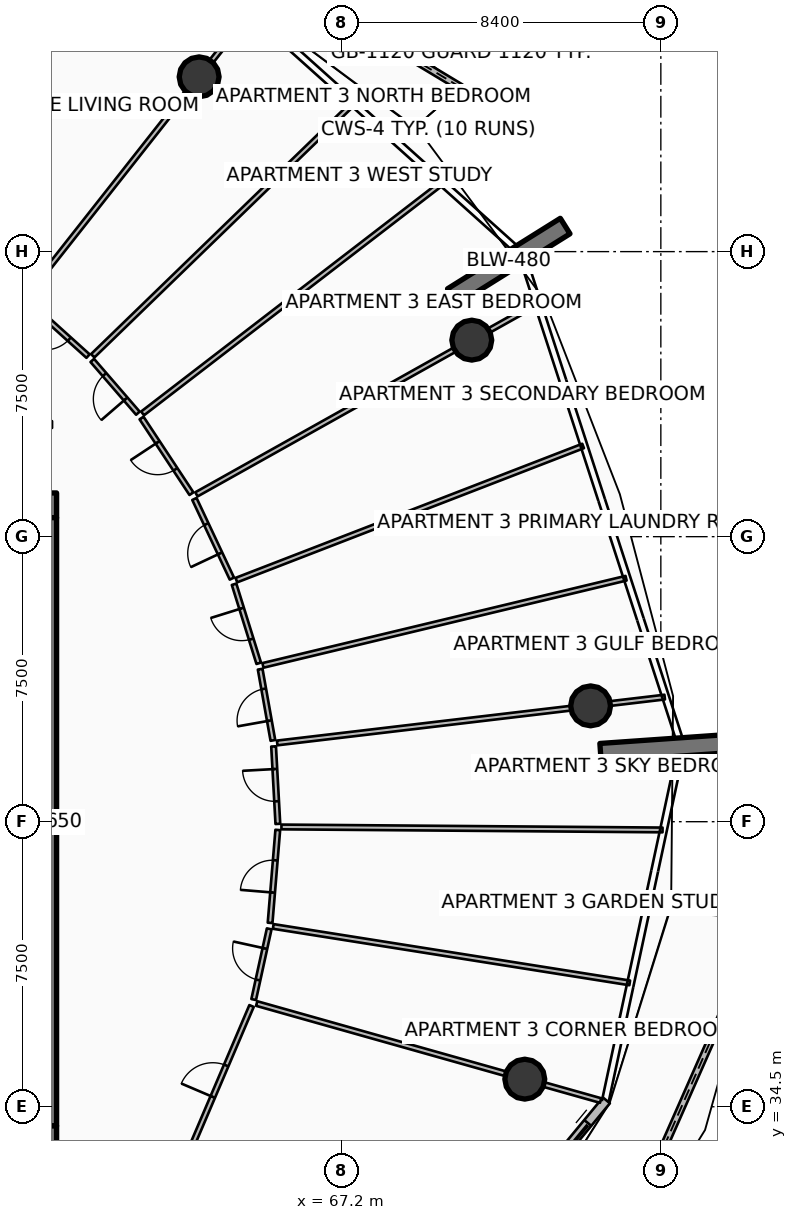
"""IFC4 building model, lengths in metres.
Left out: names, types, materials, properties, quantities, classifications, styles, units other than length and angle.
Written with IfcOpenShell. Run it as: python <this file> out.ifc"""

import sys

from ifc_helpers import new_model, si_unit, direction, frame, frame_2d, origin, origin_2d, place, context, subcontext, project, spatial, polyline, rectangle, circle, outline, extrude, element, fill, save


model = new_model("IFC4")
c1 = context("Model", 3, precision=1e-05, world=origin(), true_north=direction((0.0, 1.0)))
c2 = subcontext(c1, "Body", "Model", "MODEL_VIEW")
j1 = project(units=[si_unit("LENGTHUNIT", "METRE"), si_unit("PLANEANGLEUNIT", "RADIAN")], contexts=[c1])
p1 = place(None, origin())
s1 = spatial("IfcSite", under=j1, at=p1, CompositionType="ELEMENT")
p2 = place(p1, origin())
s2 = spatial("IfcBuilding", under=s1, at=p2, CompositionType="ELEMENT")
p3 = place(p2, frame((0.0, 0.0, 184.05)))
s3 = spatial("IfcBuildingStorey", under=s2, at=p3, CompositionType="ELEMENT", Elevation=184.05)
for number, where, z_axis, x_axis in (
    (1, (49.95, 33.675, 0.0), (0.0, 0.0, 1.0), (1.0, 0.0, 0.0)),
    (2, (49.95, 50.325, 0.0), (0.0, 0.0, 1.0), (1.0, 0.0, 0.0)),
):
    element("IfcWall", number, at=place(p3, frame(where, z_axis=z_axis, x_axis=x_axis)), inside=s3, PredefinedType="SHEAR", context=c2, shape_type="SweptSolid", body=[
        extrude(rectangle(XDim=9.75, YDim=0.65, at=frame_2d((4.875, 0.0))), origin(), (0.0, 0.0, 1.0), 3.75),
    ])
p4 = place(p3, frame((59.375, 34.0, 0.0), z_axis=(0.0, 0.0, 1.0), x_axis=(0.0, 1.0, 0.0)))
e3 = element("IfcWall", 3, at=p4, inside=s3, PredefinedType="SHEAR", context=c2, shape_type="SweptSolid", body=[
    extrude(rectangle(XDim=16.0, YDim=0.65, at=frame_2d((8.0, 0.0))), origin(), (0.0, 0.0, 1.0), 3.75),
])
p5 = place(p3, frame((70.114, 55.818, 0.0), z_axis=(0.0, 0.0, 1.0), x_axis=(0.848033572426, 0.529942506352, 0.0)))
e4 = element("IfcWall", 4, at=p5, inside=s3, PredefinedType="SOLIDWALL", context=c2, shape_type="SweptSolid", body=[
    extrude(rectangle(XDim=3.5, YDim=0.48, at=frame_2d((1.75, 0.0))), origin(), (0.0, 0.0, 1.0), 3.75),
])
p6 = place(p3, frame((74.013, 43.819, 0.0), z_axis=(0.0, 0.0, 1.0), x_axis=(0.997568676264, 0.069690287244, 0.0)))
e5 = element("IfcWall", 5, at=p6, inside=s3, PredefinedType="SOLIDWALL", context=c2, shape_type="SweptSolid", body=[
    extrude(rectangle(XDim=3.5, YDim=0.48, at=frame_2d((1.75, 0.0))), origin(), (0.0, 0.0, 1.0), 3.75),
])
for number, where, z_axis, x_axis in (
    (6, (70.625, 54.671, 0.0), (0.0, 0.0, 1.0), (1.0, 0.0, 0.0)),
    (7, (63.451, 61.599, 0.0), (0.0, 0.0, 1.0), (1.0, 0.0, 0.0)),
    (8, (72.02, 35.226, 0.0), (0.0, 0.0, 1.0), (1.0, 0.0, 0.0)),
    (9, (73.752, 45.048, 0.0), (0.0, 0.0, 1.0), (1.0, 0.0, 0.0)),
):
    element("IfcColumn", number, at=place(p3, frame(where, z_axis=z_axis, x_axis=x_axis)), inside=s3, PredefinedType="COLUMN", context=c2, shape_type="SweptSolid", body=[
        extrude(circle(Radius=0.525, at=origin_2d()), origin(), (0.0, 0.0, 1.0), 3.5),
    ])
p7 = place(p3, frame((70.34, 61.317, 0.0), z_axis=(0.0, 0.0, 1.0), x_axis=(-0.856758582714, 0.515717685314, 0.0)))
e10 = element("IfcWall", 10, at=p7, inside=s3, PredefinedType="PARAPET", context=c2, shape_type="SweptSolid", body=[
    extrude(outline(polyline([(0.0, 0.0), (11.043, 0.0), (11.043, 1.348), (5.521, 1.182), (0.0, 1.12), (0.0, 0.0)])), frame((0.0, 0.09, 0.0), z_axis=(0.0, -1.0, 0.0), x_axis=(1.0, 0.0, 0.0)), (0.0, 0.0, 1.0), 0.18),
])
p8 = place(p3, frame((73.728, 29.025, 0.0), z_axis=(0.0, 0.0, 1.0), x_axis=(0.403762319035, 0.914863918694, 0.0)))
e11 = element("IfcWall", 11, at=p8, inside=s3, PredefinedType="PARAPET", context=c2, shape_type="SweptSolid", body=[
    extrude(outline(polyline([(0.0, 0.0), (11.37, 0.0), (11.37, 1.756), (5.685, 1.853), (0.0, 1.832), (0.0, 0.0)])), frame((0.0, 0.09, 0.0), z_axis=(0.0, -1.0, 0.0), x_axis=(1.0, 0.0, 0.0)), (0.0, 0.0, 1.0), 0.18),
])
p9 = place(p3, frame((67.485, 26.576, 0.0), z_axis=(0.0, 0.0, 1.0), x_axis=(0.636759394418, 0.771062561418, 0.0)))
e12 = element("IfcWall", 12, at=p9, inside=s3, PredefinedType="SOLIDWALL", context=c2, shape_type="SweptSolid", body=[
    extrude(rectangle(XDim=10.494, YDim=0.24, at=frame_2d((5.247, 0.0))), origin(), (0.0, 0.0, 1.0), 2.45),
])
p10 = place(p9, frame((8.274, 0.0, 0.0)))
e13 = element("IfcOpeningElement", 13, at=p10, cuts=e12, PredefinedType="OPENING", context=c2, shape_type="SweptSolid", body=[
    extrude(rectangle(XDim=1.45, YDim=2.15, at=frame_2d((0.725, 1.075))), frame((0.0, 0.13, 0.0), z_axis=(0.0, -1.0, 0.0), x_axis=(1.0, 0.0, 0.0)), (0.0, 0.0, 1.0), 0.26),
])
p11 = place(p9, frame((0.28, 0.0, 0.65)))
e14 = element("IfcOpeningElement", 14, at=p11, cuts=e12, PredefinedType="OPENING", context=c2, shape_type="SweptSolid", body=[
    extrude(rectangle(XDim=1.6, YDim=1.5, at=frame_2d((0.8, 0.75))), frame((0.0, 0.13, 0.0), z_axis=(0.0, -1.0, 0.0), x_axis=(1.0, 0.0, 0.0)), (0.0, 0.0, 1.0), 0.26),
])
p12 = place(p3, frame((63.142, 33.193, 0.0), z_axis=(0.0, 0.0, 1.0), x_axis=(0.392302335844, 0.919836331796, 0.0)))
e15 = element("IfcWall", 15, at=p12, inside=s3, PredefinedType="PARTITIONING", context=c2, shape_type="SweptSolid", body=[
    extrude(rectangle(XDim=4.302, YDim=0.125, at=frame_2d((2.151, 0.0))), origin(), (0.0, 0.0, 1.0), 2.94),
])
p13 = place(p12, frame((1.701, 0.0, 0.0)))
e16 = element("IfcOpeningElement", 16, at=p13, cuts=e15, PredefinedType="OPENING", context=c2, shape_type="SweptSolid", body=[
    extrude(rectangle(XDim=0.9, YDim=2.08, at=frame_2d((0.45, 1.04))), frame((0.0, 0.073, 0.0), z_axis=(0.0, -1.0, 0.0), x_axis=(1.0, 0.0, 0.0)), (0.0, 0.0, 1.0), 0.145),
])
p14 = place(p3, frame((64.965, 37.215, 0.0), z_axis=(0.0, 0.0, 1.0), x_axis=(0.962454024137, -0.271444748378, 0.0)))
e17 = element("IfcWall", 17, at=p14, inside=s3, PredefinedType="PARTITIONING", context=c2, shape_type="SweptSolid", body=[
    extrude(rectangle(XDim=9.403, YDim=0.125, at=frame_2d((4.702, 0.0))), origin(), (0.0, 0.0, 1.0), 2.94),
])
p15 = place(p3, frame((65.4, 39.244, 0.0), z_axis=(0.0, 0.0, 1.0), x_axis=(0.987688031288, -0.156436417916, 0.0)))
e18 = element("IfcWall", 18, at=p15, inside=s3, PredefinedType="PARTITIONING", context=c2, shape_type="SweptSolid", body=[
    extrude(rectangle(XDim=9.498, YDim=0.125, at=frame_2d((4.749, 0.0))), origin(), (0.0, 0.0, 1.0), 2.94),
])
p16 = place(p3, frame((65.616, 41.862, 0.0), z_axis=(0.0, 0.0, 1.0), x_axis=(0.999969275456, -0.007838886617, 0.0)))
e19 = element("IfcWall", 19, at=p16, inside=s3, PredefinedType="PARTITIONING", context=c2, shape_type="SweptSolid", body=[
    extrude(rectangle(XDim=10.029, YDim=0.125, at=frame_2d((5.014, 0.0))), origin(), (0.0, 0.0, 1.0), 2.94),
])
p17 = place(p3, frame((64.886, 37.321, 0.0), z_axis=(0.0, 0.0, 1.0), x_axis=(0.214404311004, 0.976744998156, 0.0)))
e20 = element("IfcWall", 20, at=p17, inside=s3, PredefinedType="PARTITIONING", context=c2, shape_type="SweptSolid", body=[
    extrude(rectangle(XDim=1.904, YDim=0.125, at=frame_2d((0.952, 0.0))), origin(), (0.0, 0.0, 1.0), 2.94),
])
p18 = place(p17, frame((0.527, 0.0, 0.0)))
e21 = element("IfcOpeningElement", 21, at=p18, cuts=e20, PredefinedType="OPENING", context=c2, shape_type="SweptSolid", body=[
    extrude(rectangle(XDim=0.85, YDim=2.06, at=frame_2d((0.425, 1.03))), frame((0.0, 0.073, 0.0), z_axis=(0.0, -1.0, 0.0), x_axis=(1.0, 0.0, 0.0)), (0.0, 0.0, 1.0), 0.145),
])
p19 = place(p3, frame((65.318, 39.338, 0.0), z_axis=(0.0, 0.0, 1.0), x_axis=(0.082403040097, 0.996599086385, 0.0)))
e22 = element("IfcWall", 22, at=p19, inside=s3, PredefinedType="PARTITIONING", context=c2, shape_type="SweptSolid", body=[
    extrude(rectangle(XDim=2.453, YDim=0.125, at=frame_2d((1.227, 0.0))), origin(), (0.0, 0.0, 1.0), 2.94),
])
p20 = place(p19, frame((0.802, 0.0, 0.0)))
e23 = element("IfcOpeningElement", 23, at=p20, cuts=e22, PredefinedType="OPENING", context=c2, shape_type="SweptSolid", body=[
    extrude(rectangle(XDim=0.85, YDim=2.06, at=frame_2d((0.425, 1.03))), frame((0.0, 0.073, 0.0), z_axis=(0.0, -1.0, 0.0), x_axis=(1.0, 0.0, 0.0)), (0.0, 0.0, 1.0), 0.145),
])
p21 = place(p3, frame((65.522, 41.942, 0.0), z_axis=(0.0, 0.0, 1.0), x_axis=(-0.055019552889, 0.998485277207, 0.0)))
e24 = element("IfcWall", 24, at=p21, inside=s3, PredefinedType="PARTITIONING", context=c2, shape_type="SweptSolid", body=[
    extrude(rectangle(XDim=2.041, YDim=0.125, at=frame_2d((1.021, 0.0))), origin(), (0.0, 0.0, 1.0), 2.94),
])
p22 = place(p21, frame((0.595, 0.0, 0.0)))
e25 = element("IfcOpeningElement", 25, at=p22, cuts=e24, PredefinedType="OPENING", context=c2, shape_type="SweptSolid", body=[
    extrude(rectangle(XDim=0.85, YDim=2.06, at=frame_2d((0.425, 1.03))), frame((0.0, 0.073, 0.0), z_axis=(0.0, -1.0, 0.0), x_axis=(1.0, 0.0, 0.0)), (0.0, 0.0, 1.0), 0.145),
])
p23 = place(p3, frame((65.505, 44.072, 0.0), z_axis=(0.0, 0.0, 1.0), x_axis=(0.993069706364, 0.117526840773, 0.0)))
e26 = element("IfcWall", 26, at=p23, inside=s3, PredefinedType="PARTITIONING", context=c2, shape_type="SweptSolid", body=[
    extrude(rectangle(XDim=10.268, YDim=0.125, at=frame_2d((5.134, 0.0))), origin(), (0.0, 0.0, 1.0), 2.94),
])
p24 = place(p3, frame((65.13, 46.113, 0.0), z_axis=(0.0, 0.0, 1.0), x_axis=(0.972369708309, 0.233446247267, 0.0)))
e27 = element("IfcWall", 27, at=p24, inside=s3, PredefinedType="PARTITIONING", context=c2, shape_type="SweptSolid", body=[
    extrude(rectangle(XDim=9.826, YDim=0.125, at=frame_2d((4.913, 0.0))), origin(), (0.0, 0.0, 1.0), 2.94),
])
p25 = place(p3, frame((64.43, 48.356, 0.0), z_axis=(0.0, 0.0, 1.0), x_axis=(0.932640168577, 0.360807865709, 0.0)))
e28 = element("IfcWall", 28, at=p25, inside=s3, PredefinedType="PARTITIONING", context=c2, shape_type="SweptSolid", body=[
    extrude(rectangle(XDim=9.783, YDim=0.125, at=frame_2d((4.892, 0.0))), origin(), (0.0, 0.0, 1.0), 2.94),
])
p26 = place(p3, frame((65.391, 44.139, 0.0), z_axis=(0.0, 0.0, 1.0), x_axis=(-0.175724047716, 0.984439464393, 0.0)))
e29 = element("IfcWall", 29, at=p26, inside=s3, PredefinedType="PARTITIONING", context=c2, shape_type="SweptSolid", body=[
    extrude(rectangle(XDim=1.903, YDim=0.125, at=frame_2d((0.952, 0.0))), origin(), (0.0, 0.0, 1.0), 2.94),
])
p27 = place(p26, frame((0.527, 0.0, 0.0)))
e30 = element("IfcOpeningElement", 30, at=p27, cuts=e29, PredefinedType="OPENING", context=c2, shape_type="SweptSolid", body=[
    extrude(rectangle(XDim=0.85, YDim=2.06, at=frame_2d((0.425, 1.03))), frame((0.0, 0.073, 0.0), z_axis=(0.0, -1.0, 0.0), x_axis=(1.0, 0.0, 0.0)), (0.0, 0.0, 1.0), 0.145),
])
p28 = place(p3, frame((65.019, 46.168, 0.0), z_axis=(0.0, 0.0, 1.0), x_axis=(-0.297777206139, 0.954635394014, 0.0)))
e31 = element("IfcWall", 31, at=p28, inside=s3, PredefinedType="PARTITIONING", context=c2, shape_type="SweptSolid", body=[
    extrude(rectangle(XDim=2.178, YDim=0.125, at=frame_2d((1.089, 0.0))), origin(), (0.0, 0.0, 1.0), 2.94),
])
p29 = place(p28, frame((0.664, 0.0, 0.0)))
e32 = element("IfcOpeningElement", 32, at=p29, cuts=e31, PredefinedType="OPENING", context=c2, shape_type="SweptSolid", body=[
    extrude(rectangle(XDim=0.85, YDim=2.06, at=frame_2d((0.425, 1.03))), frame((0.0, 0.073, 0.0), z_axis=(0.0, -1.0, 0.0), x_axis=(1.0, 0.0, 0.0)), (0.0, 0.0, 1.0), 0.145),
])
p30 = place(p3, frame((64.312, 48.396, 0.0), z_axis=(0.0, 0.0, 1.0), x_axis=(-0.425705646023, 0.904861703767, 0.0)))
e33 = element("IfcWall", 33, at=p30, inside=s3, PredefinedType="PARTITIONING", context=c2, shape_type="SweptSolid", body=[
    extrude(rectangle(XDim=2.316, YDim=0.125, at=frame_2d((1.158, 0.0))), origin(), (0.0, 0.0, 1.0), 2.94),
])
p31 = place(p30, frame((0.733, 0.0, 0.0)))
e34 = element("IfcOpeningElement", 34, at=p31, cuts=e33, PredefinedType="OPENING", context=c2, shape_type="SweptSolid", body=[
    extrude(rectangle(XDim=0.85, YDim=2.06, at=frame_2d((0.425, 1.03))), frame((0.0, 0.073, 0.0), z_axis=(0.0, -1.0, 0.0), x_axis=(1.0, 0.0, 0.0)), (0.0, 0.0, 1.0), 0.145),
])
p32 = place(p3, frame((63.379, 50.613, 0.0), z_axis=(0.0, 0.0, 1.0), x_axis=(0.872503583261, 0.488607712994, 0.0)))
e35 = element("IfcWall", 35, at=p32, inside=s3, PredefinedType="PARTITIONING", context=c2, shape_type="SweptSolid", body=[
    extrude(rectangle(XDim=10.268, YDim=0.125, at=frame_2d((5.134, 0.0))), origin(), (0.0, 0.0, 1.0), 2.94),
])
p33 = place(p3, frame((58.913, 55.843, 0.0), z_axis=(0.0, 0.0, 1.0), x_axis=(0.619083548323, 0.785325130246, 0.0)))
e36 = element("IfcWall", 36, at=p33, inside=s3, PredefinedType="PARTITIONING", context=c2, shape_type="SweptSolid", body=[
    extrude(rectangle(XDim=9.503, YDim=0.125, at=frame_2d((4.751, 0.0))), origin(), (0.0, 0.0, 1.0), 2.94),
])
p34 = place(p3, frame((61.962, 52.743, 0.0), z_axis=(0.0, 0.0, 1.0), x_axis=(0.792560870927, 0.609792805693, 0.0)))
e37 = element("IfcWall", 37, at=p34, inside=s3, PredefinedType="PARTITIONING", context=c2, shape_type="SweptSolid", body=[
    extrude(rectangle(XDim=9.922, YDim=0.125, at=frame_2d((4.961, 0.0))), origin(), (0.0, 0.0, 1.0), 2.94),
])
p35 = place(p3, frame((60.651, 54.26, 0.0), z_axis=(0.0, 0.0, 1.0), x_axis=(0.718131329051, 0.695907604669, 0.0)))
e38 = element("IfcWall", 38, at=p35, inside=s3, PredefinedType="PARTITIONING", context=c2, shape_type="SweptSolid", body=[
    extrude(rectangle(XDim=9.524, YDim=0.125, at=frame_2d((4.762, 0.0))), origin(), (0.0, 0.0, 1.0), 2.94),
])
p36 = place(p3, frame((63.248, 50.631, 0.0), z_axis=(0.0, 0.0, 1.0), x_axis=(-0.550605373428, 0.834765669366, 0.0)))
e39 = element("IfcWall", 39, at=p36, inside=s3, PredefinedType="PARTITIONING", context=c2, shape_type="SweptSolid", body=[
    extrude(rectangle(XDim=2.384, YDim=0.125, at=frame_2d((1.192, 0.0))), origin(), (0.0, 0.0, 1.0), 2.94),
])
p37 = place(p36, frame((0.767, 0.0, 0.0)))
e40 = element("IfcOpeningElement", 40, at=p37, cuts=e39, PredefinedType="OPENING", context=c2, shape_type="SweptSolid", body=[
    extrude(rectangle(XDim=0.85, YDim=2.06, at=frame_2d((0.425, 1.03))), frame((0.0, 0.073, 0.0), z_axis=(0.0, -1.0, 0.0), x_axis=(1.0, 0.0, 0.0)), (0.0, 0.0, 1.0), 0.145),
])
p38 = place(p3, frame((61.839, 52.749, 0.0), z_axis=(0.0, 0.0, 1.0), x_axis=(-0.653952359422, 0.756535730555, 0.0)))
e41 = element("IfcWall", 41, at=p38, inside=s3, PredefinedType="PARTITIONING", context=c2, shape_type="SweptSolid", body=[
    extrude(rectangle(XDim=1.835, YDim=0.125, at=frame_2d((0.917, 0.0))), origin(), (0.0, 0.0, 1.0), 2.94),
])
p39 = place(p38, frame((0.492, 0.0, 0.0)))
e42 = element("IfcOpeningElement", 42, at=p39, cuts=e41, PredefinedType="OPENING", context=c2, shape_type="SweptSolid", body=[
    extrude(rectangle(XDim=0.85, YDim=2.06, at=frame_2d((0.425, 1.03))), frame((0.0, 0.073, 0.0), z_axis=(0.0, -1.0, 0.0), x_axis=(1.0, 0.0, 0.0)), (0.0, 0.0, 1.0), 0.145),
])
p40 = place(p3, frame((60.527, 54.251, 0.0), z_axis=(0.0, 0.0, 1.0), x_axis=(-0.742223129556, 0.670152837755, 0.0)))
e43 = element("IfcWall", 43, at=p40, inside=s3, PredefinedType="PARTITIONING", context=c2, shape_type="SweptSolid", body=[
    extrude(rectangle(XDim=2.178, YDim=0.125, at=frame_2d((1.089, 0.0))), origin(), (0.0, 0.0, 1.0), 2.94),
])
p41 = place(p40, frame((0.664, 0.0, 0.0)))
e44 = element("IfcOpeningElement", 44, at=p41, cuts=e43, PredefinedType="OPENING", context=c2, shape_type="SweptSolid", body=[
    extrude(rectangle(XDim=0.85, YDim=2.06, at=frame_2d((0.425, 1.03))), frame((0.0, 0.073, 0.0), z_axis=(0.0, -1.0, 0.0), x_axis=(1.0, 0.0, 0.0)), (0.0, 0.0, 1.0), 0.145),
])
p42 = place(p10, origin())
e45 = element("IfcDoor", 45, at=p42, inside=s3, OperationType="DOUBLE_DOOR_SLIDING", PredefinedType="DOOR", context=c2, shape_type="SweptSolid", body=[
    extrude(rectangle(XDim=1.45, YDim=2.15, at=frame_2d((0.725, 1.075))), frame((0.0, 0.025, 0.0), z_axis=(0.0, -1.0, 0.0), x_axis=(1.0, 0.0, 0.0)), (0.0, 0.0, 1.0), 0.05),
])
fill(e13, e45)
p43 = place(p13, origin())
e46 = element("IfcDoor", 46, at=p43, inside=s3, OperationType="SINGLE_SWING_LEFT", PredefinedType="DOOR", context=c2, shape_type="SweptSolid", body=[
    extrude(rectangle(XDim=0.9, YDim=2.08, at=frame_2d((0.45, 1.04))), frame((0.0, 0.025, 0.0), z_axis=(0.0, -1.0, 0.0), x_axis=(1.0, 0.0, 0.0)), (0.0, 0.0, 1.0), 0.05),
])
fill(e16, e46)
p44 = place(p18, origin())
e47 = element("IfcDoor", 47, at=p44, inside=s3, OperationType="SINGLE_SWING_RIGHT", PredefinedType="DOOR", context=c2, shape_type="SweptSolid", body=[
    extrude(rectangle(XDim=0.85, YDim=2.06, at=frame_2d((0.425, 1.03))), frame((0.0, 0.025, 0.0), z_axis=(0.0, -1.0, 0.0), x_axis=(1.0, 0.0, 0.0)), (0.0, 0.0, 1.0), 0.05),
])
fill(e21, e47)
p45 = place(p20, origin())
e48 = element("IfcDoor", 48, at=p45, inside=s3, OperationType="SINGLE_SWING_LEFT", PredefinedType="DOOR", context=c2, shape_type="SweptSolid", body=[
    extrude(rectangle(XDim=0.85, YDim=2.06, at=frame_2d((0.425, 1.03))), frame((0.0, 0.025, 0.0), z_axis=(0.0, -1.0, 0.0), x_axis=(1.0, 0.0, 0.0)), (0.0, 0.0, 1.0), 0.05),
])
fill(e23, e48)
p46 = place(p22, origin())
e49 = element("IfcDoor", 49, at=p46, inside=s3, OperationType="SINGLE_SWING_RIGHT", PredefinedType="DOOR", context=c2, shape_type="SweptSolid", body=[
    extrude(rectangle(XDim=0.85, YDim=2.06, at=frame_2d((0.425, 1.03))), frame((0.0, 0.025, 0.0), z_axis=(0.0, -1.0, 0.0), x_axis=(1.0, 0.0, 0.0)), (0.0, 0.0, 1.0), 0.05),
])
fill(e25, e49)
p47 = place(p27, origin())
e50 = element("IfcDoor", 50, at=p47, inside=s3, OperationType="SINGLE_SWING_LEFT", PredefinedType="DOOR", context=c2, shape_type="SweptSolid", body=[
    extrude(rectangle(XDim=0.85, YDim=2.06, at=frame_2d((0.425, 1.03))), frame((0.0, 0.025, 0.0), z_axis=(0.0, -1.0, 0.0), x_axis=(1.0, 0.0, 0.0)), (0.0, 0.0, 1.0), 0.05),
])
fill(e30, e50)
p48 = place(p29, origin())
e51 = element("IfcDoor", 51, at=p48, inside=s3, OperationType="SINGLE_SWING_RIGHT", PredefinedType="DOOR", context=c2, shape_type="SweptSolid", body=[
    extrude(rectangle(XDim=0.85, YDim=2.06, at=frame_2d((0.425, 1.03))), frame((0.0, 0.025, 0.0), z_axis=(0.0, -1.0, 0.0), x_axis=(1.0, 0.0, 0.0)), (0.0, 0.0, 1.0), 0.05),
])
fill(e32, e51)
p49 = place(p31, origin())
e52 = element("IfcDoor", 52, at=p49, inside=s3, OperationType="SINGLE_SWING_LEFT", PredefinedType="DOOR", context=c2, shape_type="SweptSolid", body=[
    extrude(rectangle(XDim=0.85, YDim=2.06, at=frame_2d((0.425, 1.03))), frame((0.0, 0.025, 0.0), z_axis=(0.0, -1.0, 0.0), x_axis=(1.0, 0.0, 0.0)), (0.0, 0.0, 1.0), 0.05),
])
fill(e34, e52)
p50 = place(p37, origin())
e53 = element("IfcDoor", 53, at=p50, inside=s3, OperationType="SINGLE_SWING_RIGHT", PredefinedType="DOOR", context=c2, shape_type="SweptSolid", body=[
    extrude(rectangle(XDim=0.85, YDim=2.06, at=frame_2d((0.425, 1.03))), frame((0.0, 0.025, 0.0), z_axis=(0.0, -1.0, 0.0), x_axis=(1.0, 0.0, 0.0)), (0.0, 0.0, 1.0), 0.05),
])
fill(e40, e53)
p51 = place(p39, origin())
e54 = element("IfcDoor", 54, at=p51, inside=s3, OperationType="SINGLE_SWING_LEFT", PredefinedType="DOOR", context=c2, shape_type="SweptSolid", body=[
    extrude(rectangle(XDim=0.85, YDim=2.06, at=frame_2d((0.425, 1.03))), frame((0.0, 0.025, 0.0), z_axis=(0.0, -1.0, 0.0), x_axis=(1.0, 0.0, 0.0)), (0.0, 0.0, 1.0), 0.05),
])
fill(e42, e54)
p52 = place(p41, origin())
e55 = element("IfcDoor", 55, at=p52, inside=s3, OperationType="SINGLE_SWING_RIGHT", PredefinedType="DOOR", context=c2, shape_type="SweptSolid", body=[
    extrude(rectangle(XDim=0.85, YDim=2.06, at=frame_2d((0.425, 1.03))), frame((0.0, 0.025, 0.0), z_axis=(0.0, -1.0, 0.0), x_axis=(1.0, 0.0, 0.0)), (0.0, 0.0, 1.0), 0.05),
])
fill(e44, e55)
save(model, sys.argv[1])
